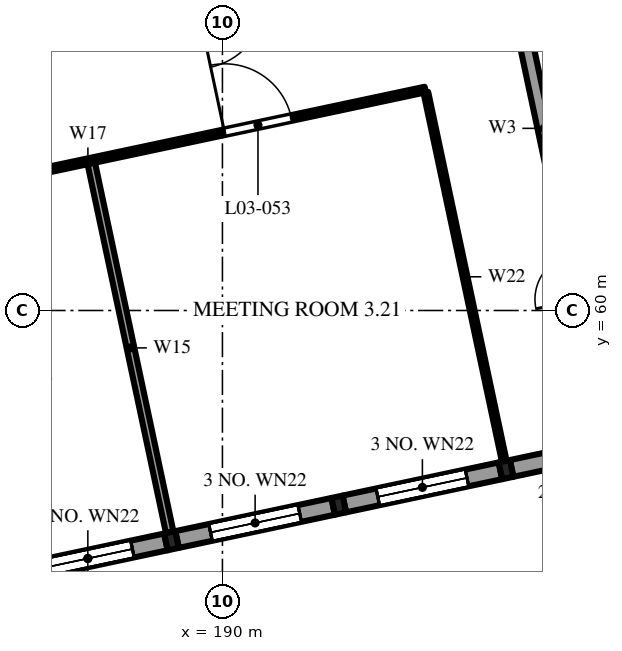
"""IFC4 building model, lengths in metres.
Left out: names, types, materials, properties, quantities, classifications, styles, units other than length and angle.
Written with IfcOpenShell. Run it as: python <this file> out.ifc"""

import sys

from ifc_helpers import new_model, si_unit, direction, frame, frame_2d, origin, origin_2d, place, context, subcontext, project, spatial, polyline, rectangle, i_section, outline, extrude, element, fill, save


model = new_model("IFC4")
c1 = context("Model", 3, precision=1e-05, world=origin(), true_north=direction((0.0, 1.0)))
c2 = subcontext(c1, "Body", "Model", "MODEL_VIEW")
j1 = project(units=[si_unit("LENGTHUNIT", "METRE"), si_unit("PLANEANGLEUNIT", "RADIAN")], contexts=[c1])
p1 = place(None, origin())
s1 = spatial("IfcSite", under=j1, at=p1, CompositionType="ELEMENT")
p2 = place(p1, origin())
s2 = spatial("IfcBuilding", under=s1, at=p2, CompositionType="ELEMENT")
p3 = place(p2, frame((0.0, 0.0, 16.8)))
s3 = spatial("IfcBuildingStorey", under=s2, at=p3, CompositionType="ELEMENT", Elevation=16.8)
for number, where, z_axis, x_axis in (
    (1, (188.659, 53.942, 0.0), (0.0, 0.0, 1.0), (0.978, 0.208, 0.0)),
    (2, (193.061, 54.877, 0.0), (0.0, 0.0, 1.0), (0.978, 0.208, 0.0)),
    (3, (197.463, 55.813, 0.0), (0.0, 0.0, 1.0), (0.978, 0.208, 0.0)),
):
    element("IfcColumn", number, at=place(p3, frame(where, z_axis=z_axis, x_axis=x_axis)), inside=s3, PredefinedType="COLUMN", context=c2, shape_type="SweptSolid", body=[
        extrude(i_section(OverallWidth=0.3, OverallDepth=0.45, WebThickness=0.014, FlangeThickness=0.026, FilletRadius=0.027, at=origin_2d()), origin(), (0.0, 0.0, 1.0), 4.8),
    ])
p4 = place(p3, frame((199.486, 60.0, 0.0), z_axis=(0.0, 0.0, 1.0), x_axis=(-0.207915693476, 0.978146749934, 0.0)))
e4 = element("IfcWall", 4, at=p4, inside=s3, PredefinedType="SOLIDWALL", context=c2, shape_type="SweptSolid", body=[
    extrude(outline(polyline([(0.0, 0.0), (8.0, 0.0), (8.0, 13.824), (0.0, 14.244), (0.0, 0.0)])), frame((0.0, 0.175, 0.0), z_axis=(0.0, -1.0, 0.0), x_axis=(1.0, 0.0, 0.0)), (0.0, 0.0, 1.0), 0.35),
])
p5 = place(p4, frame((0.3, 0.0, 0.0)))
e5 = element("IfcOpeningElement", 5, at=p5, cuts=e4, PredefinedType="OPENING", context=c2, shape_type="SweptSolid", body=[
    extrude(rectangle(XDim=1.2, YDim=2.1, at=frame_2d((0.6, 1.05))), frame((0.0, 0.185, 0.0), z_axis=(0.0, -1.0, 0.0), x_axis=(1.0, 0.0, 0.0)), (0.0, 0.0, 1.0), 0.37),
])
p6 = place(p3, frame((184.404, 53.037, 0.0), z_axis=(0.0, 0.0, 1.0), x_axis=(0.978143927149, 0.207928972925, 0.0)))
e6 = element("IfcWall", 6, at=p6, inside=s3, PredefinedType="SOLIDWALL", context=c2, shape_type="SweptSolid", body=[
    extrude(outline(polyline([(0.0, 0.0), (4.2, 0.0), (4.2, 15.094), (0.0, 14.87), (0.0, 0.0)])), frame((0.0, 0.225, 0.0), z_axis=(0.0, -1.0, 0.0), x_axis=(1.0, 0.0, 0.0)), (0.0, 0.0, 1.0), 0.45),
])
p7 = place(p6, frame((0.9, 0.0, 0.6)))
e7 = element("IfcOpeningElement", 7, at=p7, cuts=e6, PredefinedType="OPENING", context=c2, shape_type="SweptSolid", body=[
    extrude(rectangle(XDim=2.4, YDim=2.7, at=frame_2d((1.2, 1.35))), frame((0.0, 0.235, 0.0), z_axis=(0.0, -1.0, 0.0), x_axis=(1.0, 0.0, 0.0)), (0.0, 0.0, 1.0), 0.47),
])
p8 = place(p6, frame((0.9, 0.0, 5.1)))
e8 = element("IfcOpeningElement", 8, at=p8, cuts=e6, PredefinedType="OPENING", context=c2, shape_type="SweptSolid", body=[
    extrude(rectangle(XDim=2.4, YDim=2.4, at=frame_2d((1.2, 1.2))), frame((0.0, 0.235, 0.0), z_axis=(0.0, -1.0, 0.0), x_axis=(1.0, 0.0, 0.0)), (0.0, 0.0, 1.0), 0.47),
])
p9 = place(p6, frame((0.9, 0.0, 9.3)))
e9 = element("IfcOpeningElement", 9, at=p9, cuts=e6, PredefinedType="OPENING", context=c2, shape_type="SweptSolid", body=[
    extrude(rectangle(XDim=2.4, YDim=2.4, at=frame_2d((1.2, 1.2))), frame((0.0, 0.235, 0.0), z_axis=(0.0, -1.0, 0.0), x_axis=(1.0, 0.0, 0.0)), (0.0, 0.0, 1.0), 0.47),
])
p10 = place(p3, frame((188.806, 53.973, 0.0), z_axis=(0.0, 0.0, 1.0), x_axis=(0.978146440129, 0.207917150959, 0.0)))
e10 = element("IfcWall", 10, at=p10, inside=s3, PredefinedType="SOLIDWALL", context=c2, shape_type="SweptSolid", body=[
    extrude(outline(polyline([(0.0, 0.0), (4.2, 0.0), (4.2, 15.335), (0.0, 15.11), (0.0, 0.0)])), frame((0.0, 0.225, 0.0), z_axis=(0.0, -1.0, 0.0), x_axis=(1.0, 0.0, 0.0)), (0.0, 0.0, 1.0), 0.45),
])
p11 = place(p10, frame((0.9, 0.0, 0.9)))
e11 = element("IfcOpeningElement", 11, at=p11, cuts=e10, PredefinedType="OPENING", context=c2, shape_type="SweptSolid", body=[
    extrude(rectangle(XDim=2.4, YDim=2.4, at=frame_2d((1.2, 1.2))), frame((0.0, 0.235, 0.0), z_axis=(0.0, -1.0, 0.0), x_axis=(1.0, 0.0, 0.0)), (0.0, 0.0, 1.0), 0.47),
])
p12 = place(p10, frame((0.9, 0.0, 5.1)))
e12 = element("IfcOpeningElement", 12, at=p12, cuts=e10, PredefinedType="OPENING", context=c2, shape_type="SweptSolid", body=[
    extrude(rectangle(XDim=2.4, YDim=2.4, at=frame_2d((1.2, 1.2))), frame((0.0, 0.235, 0.0), z_axis=(0.0, -1.0, 0.0), x_axis=(1.0, 0.0, 0.0)), (0.0, 0.0, 1.0), 0.47),
])
p13 = place(p10, frame((0.9, 0.0, 9.3)))
e13 = element("IfcOpeningElement", 13, at=p13, cuts=e10, PredefinedType="OPENING", context=c2, shape_type="SweptSolid", body=[
    extrude(rectangle(XDim=2.4, YDim=2.4, at=frame_2d((1.2, 1.2))), frame((0.0, 0.235, 0.0), z_axis=(0.0, -1.0, 0.0), x_axis=(1.0, 0.0, 0.0)), (0.0, 0.0, 1.0), 0.47),
])
p14 = place(p3, frame((193.208, 54.908, 0.0), z_axis=(0.0, 0.0, 1.0), x_axis=(0.978146440129, 0.207917150959, 0.0)))
e14 = element("IfcWall", 14, at=p14, inside=s3, PredefinedType="SOLIDWALL", context=c2, shape_type="SweptSolid", body=[
    extrude(outline(polyline([(0.0, 0.0), (4.2, 0.0), (4.2, 15.576), (0.0, 15.351), (0.0, 0.0)])), frame((0.0, 0.225, 0.0), z_axis=(0.0, -1.0, 0.0), x_axis=(1.0, 0.0, 0.0)), (0.0, 0.0, 1.0), 0.45),
])
p15 = place(p14, frame((0.9, 0.0, 0.9)))
e15 = element("IfcOpeningElement", 15, at=p15, cuts=e14, PredefinedType="OPENING", context=c2, shape_type="SweptSolid", body=[
    extrude(rectangle(XDim=2.4, YDim=2.4, at=frame_2d((1.2, 1.2))), frame((0.0, 0.235, 0.0), z_axis=(0.0, -1.0, 0.0), x_axis=(1.0, 0.0, 0.0)), (0.0, 0.0, 1.0), 0.47),
])
p16 = place(p14, frame((0.9, 0.0, 5.1)))
e16 = element("IfcOpeningElement", 16, at=p16, cuts=e14, PredefinedType="OPENING", context=c2, shape_type="SweptSolid", body=[
    extrude(rectangle(XDim=2.4, YDim=2.4, at=frame_2d((1.2, 1.2))), frame((0.0, 0.235, 0.0), z_axis=(0.0, -1.0, 0.0), x_axis=(1.0, 0.0, 0.0)), (0.0, 0.0, 1.0), 0.47),
])
p17 = place(p14, frame((0.9, 0.0, 9.3)))
e17 = element("IfcOpeningElement", 17, at=p17, cuts=e14, PredefinedType="OPENING", context=c2, shape_type="SweptSolid", body=[
    extrude(rectangle(XDim=2.4, YDim=2.4, at=frame_2d((1.2, 1.2))), frame((0.0, 0.235, 0.0), z_axis=(0.0, -1.0, 0.0), x_axis=(1.0, 0.0, 0.0)), (0.0, 0.0, 1.0), 0.47),
])
p18 = place(p3, frame((197.609, 55.844, 0.0), z_axis=(0.0, 0.0, 1.0), x_axis=(0.978143927149, 0.207928972925, 0.0)))
e18 = element("IfcWall", 18, at=p18, inside=s3, PredefinedType="SOLIDWALL", context=c2, shape_type="SweptSolid", body=[
    extrude(outline(polyline([(0.0, 0.0), (4.2, 0.0), (4.2, 15.817), (0.0, 15.592), (0.0, 0.0)])), frame((0.0, 0.225, 0.0), z_axis=(0.0, -1.0, 0.0), x_axis=(1.0, 0.0, 0.0)), (0.0, 0.0, 1.0), 0.45),
])
p19 = place(p18, frame((0.9, 0.0, 0.45)))
e19 = element("IfcOpeningElement", 19, at=p19, cuts=e18, PredefinedType="OPENING", context=c2, shape_type="SweptSolid", body=[
    extrude(rectangle(XDim=2.4, YDim=3.3, at=frame_2d((1.2, 1.65))), frame((0.0, 0.235, 0.0), z_axis=(0.0, -1.0, 0.0), x_axis=(1.0, 0.0, 0.0)), (0.0, 0.0, 1.0), 0.47),
])
p20 = place(p18, frame((0.9, 0.0, 5.1)))
e20 = element("IfcOpeningElement", 20, at=p20, cuts=e18, PredefinedType="OPENING", context=c2, shape_type="SweptSolid", body=[
    extrude(rectangle(XDim=2.4, YDim=2.4, at=frame_2d((1.2, 1.2))), frame((0.0, 0.235, 0.0), z_axis=(0.0, -1.0, 0.0), x_axis=(1.0, 0.0, 0.0)), (0.0, 0.0, 1.0), 0.47),
])
p21 = place(p18, frame((0.9, 0.0, 9.3)))
e21 = element("IfcOpeningElement", 21, at=p21, cuts=e18, PredefinedType="OPENING", context=c2, shape_type="SweptSolid", body=[
    extrude(rectangle(XDim=2.4, YDim=2.4, at=frame_2d((1.2, 1.2))), frame((0.0, 0.235, 0.0), z_axis=(0.0, -1.0, 0.0), x_axis=(1.0, 0.0, 0.0)), (0.0, 0.0, 1.0), 0.47),
])
p22 = place(p3, frame((151.32, 56.458, 0.0), z_axis=(0.0, 0.0, 1.0), x_axis=(0.97814787394, 0.207910405482, 0.0)))
e22 = element("IfcWall", 22, at=p22, inside=s3, PredefinedType="PARTITIONING", context=c2, shape_type="SweptSolid", body=[
    extrude(outline(polyline([(0.0, 0.0), (45.0, 0.0), (45.0, 12.948), (0.0, 10.54), (0.0, 0.0)])), frame((0.0, 0.075, 0.0), z_axis=(0.0, -1.0, 0.0), x_axis=(1.0, 0.0, 0.0)), (0.0, 0.0, 1.0), 0.15),
])
p23 = place(p22, frame((3.6, 0.0, 0.0)))
e23 = element("IfcOpeningElement", 23, at=p23, cuts=e22, PredefinedType="OPENING", context=c2, shape_type="SweptSolid", body=[
    extrude(rectangle(XDim=1.8, YDim=2.1, at=frame_2d((0.9, 1.05))), frame((0.0, 0.085, 0.0), z_axis=(0.0, -1.0, 0.0), x_axis=(1.0, 0.0, 0.0)), (0.0, 0.0, 1.0), 0.17),
])
p24 = place(p22, frame((10.75, 0.0, 0.0)))
e24 = element("IfcOpeningElement", 24, at=p24, cuts=e22, PredefinedType="OPENING", context=c2, shape_type="SweptSolid", body=[
    extrude(rectangle(XDim=1.0, YDim=2.1, at=frame_2d((0.5, 1.05))), frame((0.0, 0.085, 0.0), z_axis=(0.0, -1.0, 0.0), x_axis=(1.0, 0.0, 0.0)), (0.0, 0.0, 1.0), 0.17),
])
p25 = place(p22, frame((17.1, 0.0, 0.0)))
e25 = element("IfcOpeningElement", 25, at=p25, cuts=e22, PredefinedType="OPENING", context=c2, shape_type="SweptSolid", body=[
    extrude(rectangle(XDim=1.8, YDim=2.1, at=frame_2d((0.9, 1.05))), frame((0.0, 0.085, 0.0), z_axis=(0.0, -1.0, 0.0), x_axis=(1.0, 0.0, 0.0)), (0.0, 0.0, 1.0), 0.17),
])
p26 = place(p22, frame((24.25, 0.0, 0.0)))
e26 = element("IfcOpeningElement", 26, at=p26, cuts=e22, PredefinedType="OPENING", context=c2, shape_type="SweptSolid", body=[
    extrude(rectangle(XDim=1.0, YDim=2.1, at=frame_2d((0.5, 1.05))), frame((0.0, 0.085, 0.0), z_axis=(0.0, -1.0, 0.0), x_axis=(1.0, 0.0, 0.0)), (0.0, 0.0, 1.0), 0.17),
])
p27 = place(p22, frame((30.75, 0.0, 0.0)))
e27 = element("IfcOpeningElement", 27, at=p27, cuts=e22, PredefinedType="OPENING", context=c2, shape_type="SweptSolid", body=[
    extrude(rectangle(XDim=1.5, YDim=2.1, at=frame_2d((0.75, 1.05))), frame((0.0, 0.085, 0.0), z_axis=(0.0, -1.0, 0.0), x_axis=(1.0, 0.0, 0.0)), (0.0, 0.0, 1.0), 0.17),
])
p28 = place(p22, frame((39.6, 0.0, 0.0)))
e28 = element("IfcOpeningElement", 28, at=p28, cuts=e22, PredefinedType="OPENING", context=c2, shape_type="SweptSolid", body=[
    extrude(rectangle(XDim=1.8, YDim=2.1, at=frame_2d((0.9, 1.05))), frame((0.0, 0.085, 0.0), z_axis=(0.0, -1.0, 0.0), x_axis=(1.0, 0.0, 0.0)), (0.0, 0.0, 1.0), 0.17),
])
p29 = place(p3, frame((188.613, 54.162, 0.0), z_axis=(0.0, 0.0, 1.0), x_axis=(-0.207932893358, 0.978143093754, 0.0)))
e29 = element("IfcWall", 29, at=p29, inside=s3, PredefinedType="PARTITIONING", context=c2, shape_type="SweptSolid", body=[
    extrude(outline(polyline([(0.0, 0.0), (9.925, 0.0), (9.925, 11.751), (0.0, 11.751), (0.0, 0.0)])), frame((0.0, 0.1, 0.0), z_axis=(0.0, -1.0, 0.0), x_axis=(1.0, 0.0, 0.0)), (0.0, 0.0, 1.0), 0.2),
])
p30 = place(p3, frame((197.416, 56.033, 0.0), z_axis=(0.0, 0.0, 1.0), x_axis=(-0.207904355568, 0.978149159861, 0.0)))
e30 = element("IfcWall", 30, at=p30, inside=s3, PredefinedType="PARTITIONING", context=c2, shape_type="SweptSolid", body=[
    extrude(outline(polyline([(0.0, 0.0), (9.925, 0.0), (9.925, 12.233), (0.0, 12.233), (0.0, 0.0)])), frame((0.0, 0.062, 0.0), z_axis=(0.0, -1.0, 0.0), x_axis=(1.0, 0.0, 0.0)), (0.0, 0.0, 1.0), 0.125),
])
p31 = place(p7, origin())
e31 = element("IfcWindow", 31, at=p31, inside=s3, PartitioningType="SINGLE_PANEL", PredefinedType="WINDOW", context=c2, shape_type="SweptSolid", body=[
    extrude(rectangle(XDim=2.4, YDim=2.7, at=frame_2d((1.2, 1.35))), frame((0.0, 0.03, 0.0), z_axis=(0.0, -1.0, 0.0), x_axis=(1.0, 0.0, 0.0)), (0.0, 0.0, 1.0), 0.06),
])
fill(e7, e31)
p32 = place(p8, origin())
e32 = element("IfcWindow", 32, at=p32, inside=s3, PartitioningType="SINGLE_PANEL", PredefinedType="WINDOW", context=c2, shape_type="SweptSolid", body=[
    extrude(rectangle(XDim=2.4, YDim=2.4, at=frame_2d((1.2, 1.2))), frame((0.0, 0.03, 0.0), z_axis=(0.0, -1.0, 0.0), x_axis=(1.0, 0.0, 0.0)), (0.0, 0.0, 1.0), 0.06),
])
fill(e8, e32)
p33 = place(p9, origin())
e33 = element("IfcWindow", 33, at=p33, inside=s3, PartitioningType="SINGLE_PANEL", PredefinedType="WINDOW", context=c2, shape_type="SweptSolid", body=[
    extrude(rectangle(XDim=2.4, YDim=2.4, at=frame_2d((1.2, 1.2))), frame((0.0, 0.03, 0.0), z_axis=(0.0, -1.0, 0.0), x_axis=(1.0, 0.0, 0.0)), (0.0, 0.0, 1.0), 0.06),
])
fill(e9, e33)
p34 = place(p11, origin())
e34 = element("IfcWindow", 34, at=p34, inside=s3, PartitioningType="SINGLE_PANEL", PredefinedType="WINDOW", context=c2, shape_type="SweptSolid", body=[
    extrude(rectangle(XDim=2.4, YDim=2.4, at=frame_2d((1.2, 1.2))), frame((0.0, 0.03, 0.0), z_axis=(0.0, -1.0, 0.0), x_axis=(1.0, 0.0, 0.0)), (0.0, 0.0, 1.0), 0.06),
])
fill(e11, e34)
p35 = place(p12, origin())
e35 = element("IfcWindow", 35, at=p35, inside=s3, PartitioningType="SINGLE_PANEL", PredefinedType="WINDOW", context=c2, shape_type="SweptSolid", body=[
    extrude(rectangle(XDim=2.4, YDim=2.4, at=frame_2d((1.2, 1.2))), frame((0.0, 0.03, 0.0), z_axis=(0.0, -1.0, 0.0), x_axis=(1.0, 0.0, 0.0)), (0.0, 0.0, 1.0), 0.06),
])
fill(e12, e35)
p36 = place(p13, origin())
e36 = element("IfcWindow", 36, at=p36, inside=s3, PartitioningType="SINGLE_PANEL", PredefinedType="WINDOW", context=c2, shape_type="SweptSolid", body=[
    extrude(rectangle(XDim=2.4, YDim=2.4, at=frame_2d((1.2, 1.2))), frame((0.0, 0.03, 0.0), z_axis=(0.0, -1.0, 0.0), x_axis=(1.0, 0.0, 0.0)), (0.0, 0.0, 1.0), 0.06),
])
fill(e13, e36)
p37 = place(p15, origin())
e37 = element("IfcWindow", 37, at=p37, inside=s3, PartitioningType="SINGLE_PANEL", PredefinedType="WINDOW", context=c2, shape_type="SweptSolid", body=[
    extrude(rectangle(XDim=2.4, YDim=2.4, at=frame_2d((1.2, 1.2))), frame((0.0, 0.03, 0.0), z_axis=(0.0, -1.0, 0.0), x_axis=(1.0, 0.0, 0.0)), (0.0, 0.0, 1.0), 0.06),
])
fill(e15, e37)
p38 = place(p16, origin())
e38 = element("IfcWindow", 38, at=p38, inside=s3, PartitioningType="SINGLE_PANEL", PredefinedType="WINDOW", context=c2, shape_type="SweptSolid", body=[
    extrude(rectangle(XDim=2.4, YDim=2.4, at=frame_2d((1.2, 1.2))), frame((0.0, 0.03, 0.0), z_axis=(0.0, -1.0, 0.0), x_axis=(1.0, 0.0, 0.0)), (0.0, 0.0, 1.0), 0.06),
])
fill(e16, e38)
p39 = place(p17, origin())
e39 = element("IfcWindow", 39, at=p39, inside=s3, PartitioningType="SINGLE_PANEL", PredefinedType="WINDOW", context=c2, shape_type="SweptSolid", body=[
    extrude(rectangle(XDim=2.4, YDim=2.4, at=frame_2d((1.2, 1.2))), frame((0.0, 0.03, 0.0), z_axis=(0.0, -1.0, 0.0), x_axis=(1.0, 0.0, 0.0)), (0.0, 0.0, 1.0), 0.06),
])
fill(e17, e39)
p40 = place(p28, origin())
e40 = element("IfcDoor", 40, at=p40, inside=s3, OperationType="DOUBLE_DOOR_SINGLE_SWING", PredefinedType="DOOR", context=c2, shape_type="SweptSolid", body=[
    extrude(rectangle(XDim=1.8, YDim=2.1, at=frame_2d((0.9, 1.05))), frame((0.0, 0.025, 0.0), z_axis=(0.0, -1.0, 0.0), x_axis=(1.0, 0.0, 0.0)), (0.0, 0.0, 1.0), 0.05),
])
fill(e28, e40)
save(model, sys.argv[1])
